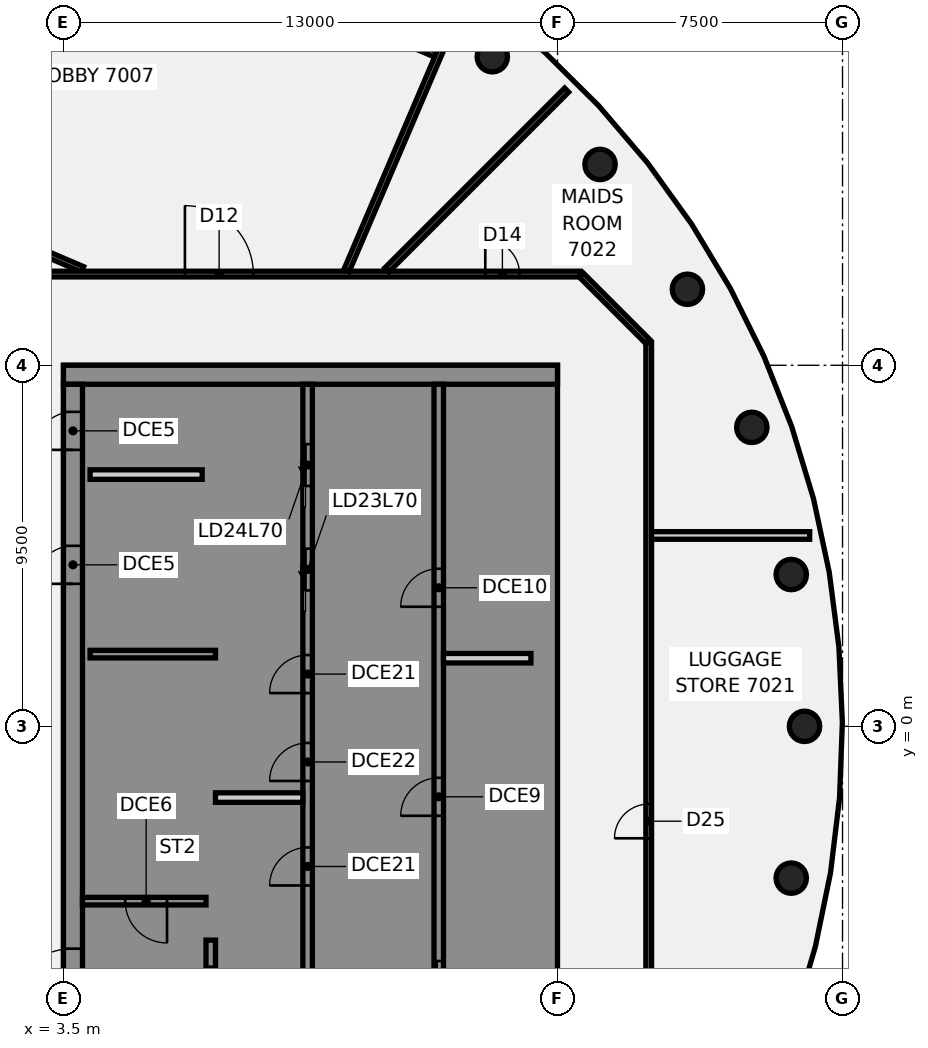
"""IFC4 building model, lengths in metres.
Left out: names, types, materials, properties, quantities, classifications, styles, units other than length and angle.
Written with IfcOpenShell. Run it as: python <this file> out.ifc"""

import sys

from ifc_helpers import new_model, si_unit, direction, frame, frame_2d, origin, origin_2d, place, context, subcontext, project, spatial, polyline, rectangle, circle, outline, extrude, element, fill, save


model = new_model("IFC4")
c1 = context("Model", 3, precision=1e-05, world=origin(), true_north=direction((0.0, 1.0)))
c2 = subcontext(c1, "Body", "Model", "MODEL_VIEW")
j1 = project(units=[si_unit("LENGTHUNIT", "METRE"), si_unit("PLANEANGLEUNIT", "RADIAN")], contexts=[c1])
p1 = place(None, origin())
s1 = spatial("IfcSite", under=j1, at=p1, CompositionType="ELEMENT")
p2 = place(p1, origin())
s2 = spatial("IfcBuilding", under=s1, at=p2, CompositionType="ELEMENT")
p3 = place(p2, frame((0.0, 0.0, 274.8)))
s3 = spatial("IfcBuildingStorey", under=s2, at=p3, CompositionType="ELEMENT", Elevation=274.8)
for number, where, z_axis, x_axis in (
    (1, (23.0, 0.0, -0.14), (0.0, 0.0, 1.0), (1.0, 0.0, 0.0)),
    (2, (22.651, 3.994, -0.14), (0.0, 0.0, 1.0), (1.0, 0.0, 0.0)),
    (3, (21.613, 7.866, -0.14), (0.0, 0.0, 1.0), (1.0, 0.0, 0.0)),
    (4, (19.919, 11.5, -0.14), (0.0, 0.0, 1.0), (1.0, 0.0, 0.0)),
    (5, (17.619, 14.784, -0.14), (0.0, 0.0, 1.0), (1.0, 0.0, 0.0)),
    (6, (14.784, 17.619, -0.14), (0.0, 0.0, 1.0), (1.0, 0.0, 0.0)),
    (7, (22.651, -3.994, -0.14), (0.0, 0.0, 1.0), (1.0, 0.0, 0.0)),
):
    element("IfcColumn", number, at=place(p3, frame(where, z_axis=z_axis, x_axis=x_axis)), inside=s3, PredefinedType="COLUMN", context=c2, shape_type="SweptSolid", body=[
        extrude(circle(Radius=0.4, at=origin_2d()), origin(), (0.0, 0.0, 1.0), 3.56),
    ])
p4 = place(p3, frame((17.128, 11.872, 0.0), z_axis=(0.0, 0.0, 1.0), x_axis=(0.707106781187, -0.707106781187, 0.0)))
e8 = element("IfcWall", 8, at=p4, inside=s3, PredefinedType="PARTITIONING", context=c2, shape_type="SweptSolid", body=[
    extrude(rectangle(XDim=2.465, YDim=0.15, at=frame_2d((1.232, 0.0))), origin(), (0.0, 0.0, 1.0), 2.824),
])
p5 = place(p3, frame((-15.911, 20.533, 0.0), z_axis=(0.0, 0.0, 1.0), x_axis=(0.919595802133, -0.392865830405, 0.0)))
e9 = element("IfcWall", 9, at=p5, inside=s3, PredefinedType="PARTITIONING", context=c2, shape_type="SweptSolid", body=[
    extrude(rectangle(XDim=21.654, YDim=0.15, at=frame_2d((10.827, 0.0))), origin(), (0.0, 0.0, 1.0), 2.824),
])
p6 = place(p5, frame((14.005, 0.0, 0.0)))
e10 = element("IfcOpeningElement", 10, at=p6, cuts=e9, PredefinedType="OPENING", context=c2, shape_type="SweptSolid", body=[
    extrude(rectangle(XDim=1.8, YDim=2.1, at=frame_2d((0.9, 1.05))), frame((0.0, 0.085, 0.0), z_axis=(0.0, -1.0, 0.0), x_axis=(1.0, 0.0, 0.0)), (0.0, 0.0, 1.0), 0.17),
])
p7 = place(p3, frame((0.351, 23.209, 0.0), z_axis=(0.0, 0.0, 1.0), x_axis=(0.919588500122, -0.392882922056, 0.0)))
e11 = element("IfcWall", 11, at=p7, inside=s3, PredefinedType="PARTITIONING", context=c2, shape_type="SweptSolid", body=[
    extrude(rectangle(XDim=14.077, YDim=0.15, at=frame_2d((7.038, 0.0))), origin(), (0.0, 0.0, 1.0), 2.824),
])
p8 = place(p7, frame((4.35, 0.0, 0.0)))
e12 = element("IfcOpeningElement", 12, at=p8, cuts=e11, PredefinedType="OPENING", context=c2, shape_type="SweptSolid", body=[
    extrude(rectangle(XDim=1.8, YDim=2.1, at=frame_2d((0.9, 1.05))), frame((0.0, 0.085, 0.0), z_axis=(0.0, -1.0, 0.0), x_axis=(1.0, 0.0, 0.0)), (0.0, 0.0, 1.0), 0.17),
])
p9 = place(p3, frame((-17.065, 11.9, 0.0), z_axis=(0.0, 0.0, 1.0), x_axis=(1.0, 0.0, 0.0)))
e13 = element("IfcWall", 13, at=p9, inside=s3, PredefinedType="PARTITIONING", context=c2, shape_type="SweptSolid", body=[
    extrude(rectangle(XDim=34.165, YDim=0.15, at=frame_2d((17.083, 0.0))), origin(), (0.0, 0.0, 1.0), 2.824),
])
p10 = place(p9, frame((23.761, 0.0, 0.0)))
e14 = element("IfcOpeningElement", 14, at=p10, cuts=e13, PredefinedType="OPENING", context=c2, shape_type="SweptSolid", body=[
    extrude(rectangle(XDim=1.8, YDim=2.1, at=frame_2d((0.9, 1.05))), frame((0.0, 0.085, 0.0), z_axis=(0.0, -1.0, 0.0), x_axis=(1.0, 0.0, 0.0)), (0.0, 0.0, 1.0), 0.17),
])
p11 = place(p9, frame((1.615, 0.0, 0.0)))
e15 = element("IfcOpeningElement", 15, at=p11, cuts=e13, PredefinedType="OPENING", context=c2, shape_type="SweptSolid", body=[
    extrude(rectangle(XDim=0.9, YDim=2.1, at=frame_2d((0.45, 1.05))), frame((0.0, 0.085, 0.0), z_axis=(0.0, -1.0, 0.0), x_axis=(1.0, 0.0, 0.0)), (0.0, 0.0, 1.0), 0.17),
])
p12 = place(p9, frame((31.665, 0.0, 0.0)))
e16 = element("IfcOpeningElement", 16, at=p12, cuts=e13, PredefinedType="OPENING", context=c2, shape_type="SweptSolid", body=[
    extrude(rectangle(XDim=0.9, YDim=2.1, at=frame_2d((0.45, 1.05))), frame((0.0, 0.085, 0.0), z_axis=(0.0, -1.0, 0.0), x_axis=(1.0, 0.0, 0.0)), (0.0, 0.0, 1.0), 0.17),
])
p13 = place(p9, frame((10.265, 0.0, 0.0)))
e17 = element("IfcOpeningElement", 17, at=p13, cuts=e13, PredefinedType="OPENING", context=c2, shape_type="SweptSolid", body=[
    extrude(rectangle(XDim=1.8, YDim=2.1, at=frame_2d((0.9, 1.05))), frame((0.0, 0.085, 0.0), z_axis=(0.0, -1.0, 0.0), x_axis=(1.0, 0.0, 0.0)), (0.0, 0.0, 1.0), 0.17),
])
p14 = place(p3, frame((18.955, 5.022, 0.0), z_axis=(0.0, 0.0, 1.0), x_axis=(1.0, 0.0, 0.0)))
e18 = element("IfcWall", 18, at=p14, inside=s3, PredefinedType="PARTITIONING", context=c2, shape_type="SweptSolid", body=[
    extrude(rectangle(XDim=4.181, YDim=0.2, at=frame_2d((2.09, 0.0))), origin(), (0.0, 0.0, 1.0), 2.824),
])
p15 = place(p3, frame((12.01, 12.01, 0.0), z_axis=(0.0, 0.0, 1.0), x_axis=(0.707106781187, 0.707106781187, 0.0)))
e19 = element("IfcWall", 19, at=p15, inside=s3, PredefinedType="PARTITIONING", context=c2, shape_type="SweptSolid", body=[
    extrude(rectangle(XDim=6.691, YDim=0.15, at=frame_2d((3.345, 0.0))), origin(), (0.0, 0.0, 1.0), 2.824),
])
p16 = place(p3, frame((10.946, 11.987, 0.0), z_axis=(0.0, 0.0, 1.0), x_axis=(0.392849254325, 0.919602883519, 0.0)))
e20 = element("IfcWall", 20, at=p16, inside=s3, PredefinedType="PARTITIONING", context=c2, shape_type="SweptSolid", body=[
    extrude(rectangle(XDim=7.74, YDim=0.15, at=frame_2d((3.87, 0.0))), origin(), (0.0, 0.0, 1.0), 2.824),
])
p17 = place(p3, frame((18.9, -10.1, 0.0), z_axis=(0.0, 0.0, 1.0), x_axis=(0.0, 1.0, 0.0)))
e21 = element("IfcWall", 21, at=p17, inside=s3, PredefinedType="PARTITIONING", context=c2, shape_type="SweptSolid", body=[
    extrude(rectangle(XDim=20.2, YDim=0.15, at=frame_2d((10.1, 0.0))), origin(), (0.0, 0.0, 1.0), 2.824),
])
p18 = place(p17, frame((7.154, 0.0, 0.0)))
e22 = element("IfcOpeningElement", 22, at=p18, cuts=e21, PredefinedType="OPENING", context=c2, shape_type="SweptSolid", body=[
    extrude(rectangle(XDim=0.9, YDim=2.1, at=frame_2d((0.45, 1.05))), frame((0.0, 0.085, 0.0), z_axis=(0.0, -1.0, 0.0), x_axis=(1.0, 0.0, 0.0)), (0.0, 0.0, 1.0), 0.17),
])
p19 = place(p3, origin())
e23 = element("IfcWall", 23, at=p19, inside=s3, PredefinedType="SHEAR", context=c2, shape_type="SweptSolid", body=[
    extrude(outline(polyline([(13.5, -8.125), (13.5, -9.0), (16.0, -9.0), (16.5, -9.0), (16.5, 9.0), (16.0, 9.0), (13.5, 9.0), (13.5, 8.125), (16.0, 8.125), (16.0, 5.625), (13.5, 5.625), (13.5, 5.375), (16.0, 5.375), (16.0, -5.375), (13.5, -5.375), (13.5, -5.625), (16.0, -5.625), (16.0, -8.125), (13.5, -8.125)])), origin(), (0.0, 0.0, 1.0), 3.42),
])
p20 = place(p3, frame((16.5, 9.25, 0.0), z_axis=(0.0, 0.0, 1.0), x_axis=(-1.0, 0.0, 0.0)))
e24 = element("IfcWall", 24, at=p20, inside=s3, PredefinedType="SHEAR", context=c2, shape_type="SweptSolid", body=[
    extrude(rectangle(XDim=13.0, YDim=0.5, at=frame_2d((6.5, 0.0))), origin(), (0.0, 0.0, 1.0), 3.42),
])
p21 = place(p3, origin())
e25 = element("IfcWall", 25, at=p21, inside=s3, PredefinedType="SHEAR", context=c2, shape_type="SweptSolid", body=[
    extrude(outline(polyline([(9.8, -5.375), (7.5, -5.375), (7.5, 2.625), (9.8, 2.625), (9.8, 2.875), (7.5, 2.875), (7.5, 5.375), (9.8, 5.375), (9.8, 5.625), (7.5, 5.625), (7.5, 8.125), (9.8, 8.125), (9.8, 9.0), (7.5, 9.0), (7.25, 9.0), (7.25, -5.625), (7.5, -5.625), (9.8, -5.625), (9.8, -5.375)])), origin(), (0.0, 0.0, 1.0), 3.42),
])
p22 = place(p3, origin())
e26 = element("IfcWall", 26, at=p22, inside=s3, PredefinedType="SHEAR", context=c2, shape_type="SweptSolid", body=[
    extrude(outline(polyline([(7.5, -8.125), (7.5, -9.0), (9.8, -9.0), (9.8, -8.125), (9.8, -5.625), (9.55, -5.625), (9.55, -8.125), (7.5, -8.125)])), origin(), (0.0, 0.0, 1.0), 3.42),
])
p23 = place(p3, frame((7.5, 1.9, 0.0), z_axis=(0.0, 0.0, 1.0), x_axis=(-1.0, 0.0, 0.0)))
e27 = element("IfcWall", 27, at=p23, inside=s3, PredefinedType="SHEAR", context=c2, shape_type="SweptSolid", body=[
    extrude(rectangle(XDim=3.3, YDim=0.2, at=frame_2d((1.65, 0.0))), origin(), (0.0, 0.0, 1.0), 3.42),
])
p24 = place(p3, frame((13.375, -9.0, 0.0), z_axis=(0.0, 0.0, 1.0), x_axis=(0.0, 1.0, 0.0)))
e28 = element("IfcWall", 28, at=p24, inside=s3, PredefinedType="SHEAR", context=c2, shape_type="SweptSolid", body=[
    extrude(rectangle(XDim=18.0, YDim=0.25, at=frame_2d((9.0, 0.0))), origin(), (0.0, 0.0, 1.0), 3.42),
])
p25 = place(p24, frame((1.425, 0.0, 0.0)))
e29 = element("IfcOpeningElement", 29, at=p25, cuts=e28, PredefinedType="OPENING", context=c2, shape_type="SweptSolid", body=[
    extrude(rectangle(XDim=1.4, YDim=2.1, at=frame_2d((0.7, 1.05))), frame((0.0, 0.135, 0.0), z_axis=(0.0, -1.0, 0.0), x_axis=(1.0, 0.0, 0.0)), (0.0, 0.0, 1.0), 0.27),
])
p26 = place(p24, frame((6.646, 0.0, 0.0)))
e30 = element("IfcOpeningElement", 30, at=p26, cuts=e28, PredefinedType="OPENING", context=c2, shape_type="SweptSolid", body=[
    extrude(rectangle(XDim=1.0, YDim=2.1, at=frame_2d((0.5, 1.05))), frame((0.0, 0.135, 0.0), z_axis=(0.0, -1.0, 0.0), x_axis=(1.0, 0.0, 0.0)), (0.0, 0.0, 1.0), 0.27),
])
p27 = place(p24, frame((12.146, 0.0, 0.0)))
e31 = element("IfcOpeningElement", 31, at=p27, cuts=e28, PredefinedType="OPENING", context=c2, shape_type="SweptSolid", body=[
    extrude(rectangle(XDim=1.0, YDim=2.1, at=frame_2d((0.5, 1.05))), frame((0.0, 0.135, 0.0), z_axis=(0.0, -1.0, 0.0), x_axis=(1.0, 0.0, 0.0)), (0.0, 0.0, 1.0), 0.27),
])
p28 = place(p3, frame((9.925, -9.0, 0.0), z_axis=(0.0, 0.0, 1.0), x_axis=(0.0, 1.0, 0.0)))
e32 = element("IfcWall", 32, at=p28, inside=s3, PredefinedType="SHEAR", context=c2, shape_type="SweptSolid", body=[
    extrude(rectangle(XDim=18.0, YDim=0.25, at=frame_2d((9.0, 0.0))), origin(), (0.0, 0.0, 1.0), 3.42),
])
p29 = place(p28, frame((12.575, 0.0, 0.0)))
e33 = element("IfcOpeningElement", 33, at=p29, cuts=e32, PredefinedType="OPENING", context=c2, shape_type="SweptSolid", body=[
    extrude(rectangle(XDim=1.1, YDim=2.1, at=frame_2d((0.55, 1.05))), frame((0.0, 0.135, 0.0), z_axis=(0.0, -1.0, 0.0), x_axis=(1.0, 0.0, 0.0)), (0.0, 0.0, 1.0), 0.27),
])
p30 = place(p28, frame((15.325, 0.0, 0.0)))
e34 = element("IfcOpeningElement", 34, at=p30, cuts=e32, PredefinedType="OPENING", context=c2, shape_type="SweptSolid", body=[
    extrude(rectangle(XDim=1.1, YDim=2.1, at=frame_2d((0.55, 1.05))), frame((0.0, 0.135, 0.0), z_axis=(0.0, -1.0, 0.0), x_axis=(1.0, 0.0, 0.0)), (0.0, 0.0, 1.0), 0.27),
])
p31 = place(p28, frame((4.812, 0.0, 0.0)))
e35 = element("IfcOpeningElement", 35, at=p31, cuts=e32, PredefinedType="OPENING", context=c2, shape_type="SweptSolid", body=[
    extrude(rectangle(XDim=1.0, YDim=2.1, at=frame_2d((0.5, 1.05))), frame((0.0, 0.135, 0.0), z_axis=(0.0, -1.0, 0.0), x_axis=(1.0, 0.0, 0.0)), (0.0, 0.0, 1.0), 0.27),
])
p32 = place(p28, frame((7.562, 0.0, 0.0)))
e36 = element("IfcOpeningElement", 36, at=p32, cuts=e32, PredefinedType="OPENING", context=c2, shape_type="SweptSolid", body=[
    extrude(rectangle(XDim=1.0, YDim=2.1, at=frame_2d((0.5, 1.05))), frame((0.0, 0.135, 0.0), z_axis=(0.0, -1.0, 0.0), x_axis=(1.0, 0.0, 0.0)), (0.0, 0.0, 1.0), 0.27),
])
p33 = place(p28, frame((9.875, 0.0, 0.0)))
e37 = element("IfcOpeningElement", 37, at=p33, cuts=e32, PredefinedType="OPENING", context=c2, shape_type="SweptSolid", body=[
    extrude(rectangle(XDim=1.0, YDim=2.1, at=frame_2d((0.5, 1.05))), frame((0.0, 0.135, 0.0), z_axis=(0.0, -1.0, 0.0), x_axis=(1.0, 0.0, 0.0)), (0.0, 0.0, 1.0), 0.27),
])
p34 = place(p3, frame((7.375, -8.125, 0.0), z_axis=(0.0, 0.0, 1.0), x_axis=(0.0, 1.0, 0.0)))
e38 = element("IfcWall", 38, at=p34, inside=s3, PredefinedType="SHEAR", context=c2, shape_type="SweptSolid", body=[
    extrude(rectangle(XDim=2.5, YDim=0.25, at=frame_2d((1.25, 0.0))), origin(), (0.0, 0.0, 1.0), 3.42),
])
p35 = place(p34, frame((0.7, 0.0, 0.0)))
e39 = element("IfcOpeningElement", 39, at=p35, cuts=e38, PredefinedType="OPENING", context=c2, shape_type="SweptSolid", body=[
    extrude(rectangle(XDim=1.1, YDim=2.1, at=frame_2d((0.55, 1.05))), frame((0.0, 0.135, 0.0), z_axis=(0.0, -1.0, 0.0), x_axis=(1.0, 0.0, 0.0)), (0.0, 0.0, 1.0), 0.27),
])
p36 = place(p3, frame((3.75, -9.0, 0.0), z_axis=(0.0, 0.0, 1.0), x_axis=(0.0, 1.0, 0.0)))
e40 = element("IfcWall", 40, at=p36, inside=s3, PredefinedType="SHEAR", context=c2, shape_type="SweptSolid", body=[
    extrude(rectangle(XDim=18.0, YDim=0.5, at=frame_2d((9.0, 0.0))), origin(), (0.0, 0.0, 1.0), 3.42),
])
p37 = place(p36, frame((1.35, 0.0, 0.0)))
e41 = element("IfcOpeningElement", 41, at=p37, cuts=e40, PredefinedType="OPENING", context=c2, shape_type="SweptSolid", body=[
    extrude(rectangle(XDim=1.8, YDim=2.1, at=frame_2d((0.9, 1.05))), frame((0.0, 0.26, 0.0), z_axis=(0.0, -1.0, 0.0), x_axis=(1.0, 0.0, 0.0)), (0.0, 0.0, 1.0), 0.52),
])
p38 = place(p36, frame((12.75, 0.0, 0.0)))
e42 = element("IfcOpeningElement", 42, at=p38, cuts=e40, PredefinedType="OPENING", context=c2, shape_type="SweptSolid", body=[
    extrude(rectangle(XDim=1.0, YDim=2.1, at=frame_2d((0.5, 1.05))), frame((0.0, 0.26, 0.0), z_axis=(0.0, -1.0, 0.0), x_axis=(1.0, 0.0, 0.0)), (0.0, 0.0, 1.0), 0.52),
])
p39 = place(p36, frame((16.274, 0.0, 0.0)))
e43 = element("IfcOpeningElement", 43, at=p39, cuts=e40, PredefinedType="OPENING", context=c2, shape_type="SweptSolid", body=[
    extrude(rectangle(XDim=1.0, YDim=2.1, at=frame_2d((0.5, 1.05))), frame((0.0, 0.26, 0.0), z_axis=(0.0, -1.0, 0.0), x_axis=(1.0, 0.0, 0.0)), (0.0, 0.0, 1.0), 0.52),
])
p40 = place(p3, frame((7.15, 6.624, 0.0), z_axis=(0.0, 0.0, 1.0), x_axis=(-1.0, 0.0, 0.0)))
e44 = element("IfcWall", 44, at=p40, inside=s3, PredefinedType="PARTITIONING", context=c2, shape_type="SweptSolid", body=[
    extrude(rectangle(XDim=2.95, YDim=0.25, at=frame_2d((1.475, 0.0))), origin(), (0.0, 0.0, 1.0), 3.42),
])
p41 = place(p3, frame((7.25, -4.6, 0.0), z_axis=(0.0, 0.0, 1.0), x_axis=(-1.0, 0.0, 0.0)))
e45 = element("IfcWall", 45, at=p41, inside=s3, PredefinedType="SHEAR", context=c2, shape_type="SweptSolid", body=[
    extrude(rectangle(XDim=3.25, YDim=0.2, at=frame_2d((1.625, 0.0))), origin(), (0.0, 0.0, 1.0), 3.42),
])
p42 = place(p41, frame((1.025, 0.0, 0.0)))
e46 = element("IfcOpeningElement", 46, at=p42, cuts=e45, PredefinedType="OPENING", context=c2, shape_type="SweptSolid", body=[
    extrude(rectangle(XDim=1.1, YDim=2.1, at=frame_2d((0.55, 1.05))), frame((0.0, 0.11, 0.0), z_axis=(0.0, -1.0, 0.0), x_axis=(1.0, 0.0, 0.0)), (0.0, 0.0, 1.0), 0.22),
])
for number, where, z_axis, x_axis in (
    (47, (15.8, 1.792, 0.0), (0.0, 0.0, 1.0), (-1.0, 0.0, 0.0)),
    (48, (9.8, -1.875, 0.0), (0.0, 0.0, 1.0), (-1.0, 0.0, 0.0)),
):
    element("IfcWall", number, at=place(p3, frame(where, z_axis=z_axis, x_axis=x_axis)), inside=s3, PredefinedType="PARTITIONING", context=c2, shape_type="SweptSolid", body=[
        extrude(rectangle(XDim=2.3, YDim=0.25, at=frame_2d((1.15, 0.0))), origin(), (0.0, 0.0, 1.0), 3.42),
    ])
p43 = place(p10, frame((1.8, 0.0, 0.0), z_axis=(0.0, 0.0, 1.0), x_axis=(-1.0, 0.0, 0.0)))
e49 = element("IfcDoor", 49, at=p43, inside=s3, OperationType="DOUBLE_DOOR_SINGLE_SWING", PredefinedType="DOOR", context=c2, shape_type="SweptSolid", body=[
    extrude(rectangle(XDim=1.8, YDim=2.1, at=frame_2d((0.9, 1.05))), frame((0.0, 0.025, 0.0), z_axis=(0.0, -1.0, 0.0), x_axis=(1.0, 0.0, 0.0)), (0.0, 0.0, 1.0), 0.05),
])
fill(e14, e49)
p44 = place(p12, origin())
e50 = element("IfcDoor", 50, at=p44, inside=s3, OperationType="SINGLE_SWING_LEFT", PredefinedType="DOOR", context=c2, shape_type="SweptSolid", body=[
    extrude(rectangle(XDim=0.9, YDim=2.1, at=frame_2d((0.45, 1.05))), frame((0.0, 0.025, 0.0), z_axis=(0.0, -1.0, 0.0), x_axis=(1.0, 0.0, 0.0)), (0.0, 0.0, 1.0), 0.05),
])
fill(e16, e50)
p45 = place(p18, frame((0.9, 0.0, 0.0), z_axis=(0.0, 0.0, 1.0), x_axis=(-1.0, 0.0, 0.0)))
e51 = element("IfcDoor", 51, at=p45, inside=s3, OperationType="SINGLE_SWING_LEFT", PredefinedType="DOOR", context=c2, shape_type="SweptSolid", body=[
    extrude(rectangle(XDim=0.9, YDim=2.1, at=frame_2d((0.45, 1.05))), frame((0.0, 0.025, 0.0), z_axis=(0.0, -1.0, 0.0), x_axis=(1.0, 0.0, 0.0)), (0.0, 0.0, 1.0), 0.05),
])
fill(e22, e51)
p46 = place(p37, origin())
e52 = element("IfcDoor", 52, at=p46, inside=s3, OperationType="SINGLE_SWING_LEFT", PredefinedType="DOOR", context=c2, shape_type="SweptSolid", body=[
    extrude(rectangle(XDim=1.8, YDim=2.1, at=frame_2d((0.9, 1.05))), frame((0.0, 0.025, 0.0), z_axis=(0.0, -1.0, 0.0), x_axis=(1.0, 0.0, 0.0)), (0.0, 0.0, 1.0), 0.05),
])
fill(e41, e52)
p47 = place(p38, origin())
e53 = element("IfcDoor", 53, at=p47, inside=s3, OperationType="SINGLE_SWING_LEFT", PredefinedType="DOOR", context=c2, shape_type="SweptSolid", body=[
    extrude(rectangle(XDim=1.0, YDim=2.1, at=frame_2d((0.5, 1.05))), frame((0.0, -0.175, 0.0), z_axis=(0.0, -1.0, 0.0), x_axis=(1.0, 0.0, 0.0)), (0.0, 0.0, 1.0), 0.05),
])
fill(e42, e53)
p48 = place(p39, origin())
e54 = element("IfcDoor", 54, at=p48, inside=s3, OperationType="SINGLE_SWING_LEFT", PredefinedType="DOOR", context=c2, shape_type="SweptSolid", body=[
    extrude(rectangle(XDim=1.0, YDim=2.1, at=frame_2d((0.5, 1.05))), frame((0.0, -0.175, 0.0), z_axis=(0.0, -1.0, 0.0), x_axis=(1.0, 0.0, 0.0)), (0.0, 0.0, 1.0), 0.05),
])
fill(e43, e54)
p49 = place(p42, origin())
e55 = element("IfcDoor", 55, at=p49, inside=s3, OperationType="SINGLE_SWING_LEFT", PredefinedType="DOOR", context=c2, shape_type="SweptSolid", body=[
    extrude(rectangle(XDim=1.1, YDim=2.1, at=frame_2d((0.55, 1.05))), frame((0.0, 0.025, 0.0), z_axis=(0.0, -1.0, 0.0), x_axis=(1.0, 0.0, 0.0)), (0.0, 0.0, 1.0), 0.05),
])
fill(e46, e55)
p50 = place(p25, origin())
e56 = element("IfcDoor", 56, at=p50, inside=s3, OperationType="SLIDING_TO_LEFT", PredefinedType="DOOR", context=c2, shape_type="SweptSolid", body=[
    extrude(rectangle(XDim=1.4, YDim=2.1, at=frame_2d((0.7, 1.05))), frame((0.0, 0.025, 0.0), z_axis=(0.0, -1.0, 0.0), x_axis=(1.0, 0.0, 0.0)), (0.0, 0.0, 1.0), 0.05),
])
fill(e29, e56)
p51 = place(p35, origin())
e57 = element("IfcDoor", 57, at=p51, inside=s3, OperationType="SLIDING_TO_LEFT", PredefinedType="DOOR", context=c2, shape_type="SweptSolid", body=[
    extrude(rectangle(XDim=1.1, YDim=2.1, at=frame_2d((0.55, 1.05))), frame((0.0, 0.025, 0.0), z_axis=(0.0, -1.0, 0.0), x_axis=(1.0, 0.0, 0.0)), (0.0, 0.0, 1.0), 0.05),
])
fill(e39, e57)
p52 = place(p29, origin())
e58 = element("IfcDoor", 58, at=p52, inside=s3, OperationType="SLIDING_TO_LEFT", PredefinedType="DOOR", context=c2, shape_type="SweptSolid", body=[
    extrude(rectangle(XDim=1.1, YDim=2.1, at=frame_2d((0.55, 1.05))), frame((0.0, 0.025, 0.0), z_axis=(0.0, -1.0, 0.0), x_axis=(1.0, 0.0, 0.0)), (0.0, 0.0, 1.0), 0.05),
])
fill(e33, e58)
p53 = place(p30, origin())
e59 = element("IfcDoor", 59, at=p53, inside=s3, OperationType="SLIDING_TO_LEFT", PredefinedType="DOOR", context=c2, shape_type="SweptSolid", body=[
    extrude(rectangle(XDim=1.1, YDim=2.1, at=frame_2d((0.55, 1.05))), frame((0.0, 0.025, 0.0), z_axis=(0.0, -1.0, 0.0), x_axis=(1.0, 0.0, 0.0)), (0.0, 0.0, 1.0), 0.05),
])
fill(e34, e59)
p54 = place(p26, origin())
e60 = element("IfcDoor", 60, at=p54, inside=s3, OperationType="SINGLE_SWING_LEFT", PredefinedType="DOOR", context=c2, shape_type="SweptSolid", body=[
    extrude(rectangle(XDim=1.0, YDim=2.1, at=frame_2d((0.5, 1.05))), frame((0.0, 0.025, 0.0), z_axis=(0.0, -1.0, 0.0), x_axis=(1.0, 0.0, 0.0)), (0.0, 0.0, 1.0), 0.05),
])
fill(e30, e60)
p55 = place(p27, origin())
e61 = element("IfcDoor", 61, at=p55, inside=s3, OperationType="SINGLE_SWING_LEFT", PredefinedType="DOOR", context=c2, shape_type="SweptSolid", body=[
    extrude(rectangle(XDim=1.0, YDim=2.1, at=frame_2d((0.5, 1.05))), frame((0.0, 0.025, 0.0), z_axis=(0.0, -1.0, 0.0), x_axis=(1.0, 0.0, 0.0)), (0.0, 0.0, 1.0), 0.05),
])
fill(e31, e61)
p56 = place(p31, origin())
e62 = element("IfcDoor", 62, at=p56, inside=s3, OperationType="SINGLE_SWING_LEFT", PredefinedType="DOOR", context=c2, shape_type="SweptSolid", body=[
    extrude(rectangle(XDim=1.0, YDim=2.1, at=frame_2d((0.5, 1.05))), frame((0.0, 0.025, 0.0), z_axis=(0.0, -1.0, 0.0), x_axis=(1.0, 0.0, 0.0)), (0.0, 0.0, 1.0), 0.05),
])
fill(e35, e62)
p57 = place(p32, origin())
e63 = element("IfcDoor", 63, at=p57, inside=s3, OperationType="SINGLE_SWING_LEFT", PredefinedType="DOOR", context=c2, shape_type="SweptSolid", body=[
    extrude(rectangle(XDim=1.0, YDim=2.1, at=frame_2d((0.5, 1.05))), frame((0.0, 0.025, 0.0), z_axis=(0.0, -1.0, 0.0), x_axis=(1.0, 0.0, 0.0)), (0.0, 0.0, 1.0), 0.05),
])
fill(e36, e63)
p58 = place(p33, origin())
e64 = element("IfcDoor", 64, at=p58, inside=s3, OperationType="SINGLE_SWING_LEFT", PredefinedType="DOOR", context=c2, shape_type="SweptSolid", body=[
    extrude(rectangle(XDim=1.0, YDim=2.1, at=frame_2d((0.5, 1.05))), frame((0.0, 0.025, 0.0), z_axis=(0.0, -1.0, 0.0), x_axis=(1.0, 0.0, 0.0)), (0.0, 0.0, 1.0), 0.05),
])
fill(e37, e64)
save(model, sys.argv[1])
